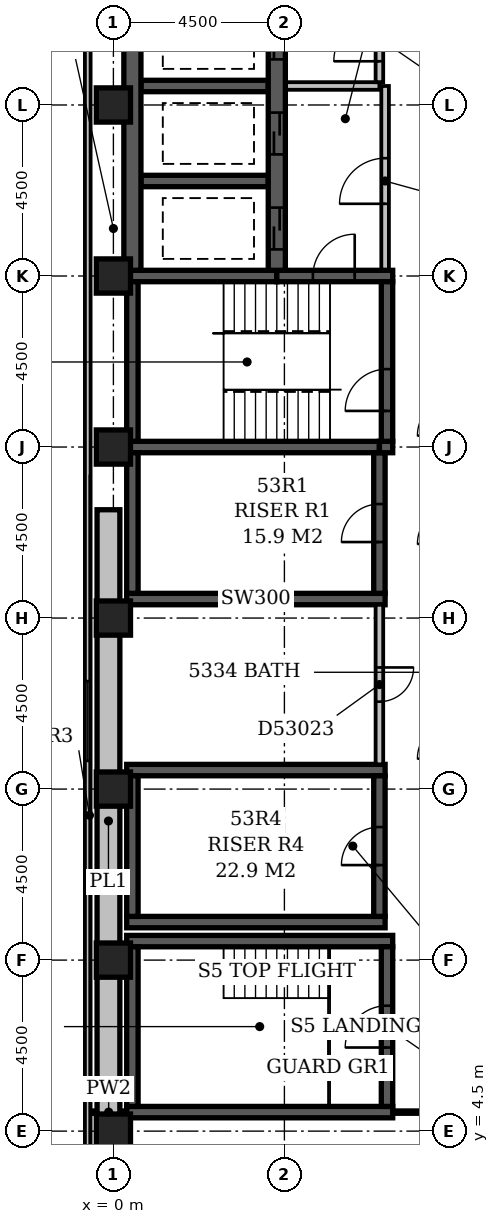
"""IFC4 building model, lengths in metres.
Left out: names, types, materials, properties, quantities, classifications, styles, units other than length and angle.
Written with IfcOpenShell. Run it as: python <this file> out.ifc"""

import sys

from ifc_helpers import new_model, si_unit, direction, frame, frame_2d, origin, origin_2d, place, context, subcontext, project, spatial, rectangle, extrude, element, fill, save


model = new_model("IFC4")
c1 = context("Model", 3, precision=1e-05, world=origin(), true_north=direction((0.0, 1.0)))
c2 = subcontext(c1, "Body", "Model", "MODEL_VIEW")
j1 = project(units=[si_unit("LENGTHUNIT", "METRE"), si_unit("PLANEANGLEUNIT", "RADIAN")], contexts=[c1])
p1 = place(None, origin())
s1 = spatial("IfcSite", under=j1, at=p1, CompositionType="ELEMENT")
p2 = place(p1, origin())
s2 = spatial("IfcBuilding", under=s1, at=p2, CompositionType="ELEMENT")
p3 = place(p2, frame((0.0, 0.0, 207.8)))
s3 = spatial("IfcBuildingStorey", under=s2, at=p3, CompositionType="ELEMENT", Elevation=207.8)
for number, where, z_axis, x_axis in (
    (1, (0.35, 5.0, -0.3), (0.0, 0.0, 1.0), (1.0, 0.0, 0.0)),
    (2, (0.35, 9.5, -0.3), (0.0, 0.0, 1.0), (1.0, 0.0, 0.0)),
):
    element("IfcWall", number, at=place(p3, frame(where, z_axis=z_axis, x_axis=x_axis)), inside=s3, PredefinedType="SHEAR", context=c2, shape_type="SweptSolid", body=[
        extrude(rectangle(XDim=7.0, YDim=0.3, at=frame_2d((3.5, 0.0))), origin(), (0.0, 0.0, 1.0), 3.55),
    ])
for number, where, z_axis, x_axis in (
    (3, (0.35, 10.0, -0.3), (0.0, 0.0, 1.0), (1.0, 0.0, 0.0)),
    (4, (0.35, 14.0, -0.3), (0.0, 0.0, 1.0), (1.0, 0.0, 0.0)),
    (5, (0.35, 18.5, -0.3), (0.0, 0.0, 1.0), (1.0, 0.0, 0.0)),
):
    element("IfcWall", number, at=place(p3, frame(where, z_axis=z_axis, x_axis=x_axis)), inside=s3, PredefinedType="SHEAR", context=c2, shape_type="SweptSolid", body=[
        extrude(rectangle(XDim=6.8, YDim=0.3, at=frame_2d((3.4, 0.0))), origin(), (0.0, 0.0, 1.0), 3.55),
    ])
p4 = place(p3, frame((0.35, 22.5, -0.3), z_axis=(0.0, 0.0, 1.0), x_axis=(1.0, 0.0, 0.0)))
e6 = element("IfcWall", 6, at=p4, inside=s3, PredefinedType="SHEAR", context=c2, shape_type="SweptSolid", body=[
    extrude(rectangle(XDim=6.65, YDim=0.3, at=frame_2d((3.325, 0.0))), origin(), (0.0, 0.0, 1.0), 3.55),
])
p5 = place(p3, frame((0.35, 27.0, -0.3), z_axis=(0.0, 0.0, 1.0), x_axis=(1.0, 0.0, 0.0)))
e7 = element("IfcWall", 7, at=p5, inside=s3, PredefinedType="SHEAR", context=c2, shape_type="SweptSolid", body=[
    extrude(rectangle(XDim=3.95, YDim=0.3, at=frame_2d((1.975, 0.0))), origin(), (0.0, 0.0, 1.0), 3.55),
])
p6 = place(p3, frame((0.5, 5.15, -0.3), z_axis=(0.0, 0.0, 1.0), x_axis=(0.0, 1.0, 0.0)))
e8 = element("IfcWall", 8, at=p6, inside=s3, PredefinedType="SHEAR", context=c2, shape_type="SweptSolid", body=[
    extrude(rectangle(XDim=4.2, YDim=0.3, at=frame_2d((2.1, 0.0))), origin(), (0.0, 0.0, 1.0), 3.55),
])
for number, where, z_axis, x_axis in (
    (9, (0.5, 10.15, -0.3), (0.0, 0.0, 1.0), (0.0, 1.0, 0.0)),
    (10, (0.5, 18.65, -0.3), (0.0, 0.0, 1.0), (0.0, 1.0, 0.0)),
):
    element("IfcWall", number, at=place(p3, frame(where, z_axis=z_axis, x_axis=x_axis)), inside=s3, PredefinedType="SHEAR", context=c2, shape_type="SweptSolid", body=[
        extrude(rectangle(XDim=3.7, YDim=0.3, at=frame_2d((1.85, 0.0))), origin(), (0.0, 0.0, 1.0), 3.55),
    ])
p7 = place(p3, frame((0.5, 22.65, -0.3), z_axis=(0.0, 0.0, 1.0), x_axis=(0.0, 1.0, 0.0)))
e11 = element("IfcWall", 11, at=p7, inside=s3, PredefinedType="SHEAR", context=c2, shape_type="SweptSolid", body=[
    extrude(rectangle(XDim=4.2, YDim=0.3, at=frame_2d((2.1, 0.0))), origin(), (0.0, 0.0, 1.0), 3.55),
])
p8 = place(p3, frame((0.5, 27.15, -0.3), z_axis=(0.0, 0.0, 1.0), x_axis=(0.0, 1.0, 0.0)))
e12 = element("IfcWall", 12, at=p8, inside=s3, PredefinedType="SHEAR", context=c2, shape_type="SweptSolid", body=[
    extrude(rectangle(XDim=22.125, YDim=0.45, at=frame_2d((11.062, 0.0))), origin(), (0.0, 0.0, 1.0), 3.55),
])
for number, where, z_axis, x_axis in (
    (13, (0.725, 29.5, -0.3), (0.0, 0.0, 1.0), (1.0, 0.0, 0.0)),
    (14, (0.725, 32.0, -0.3), (0.0, 0.0, 1.0), (1.0, 0.0, 0.0)),
):
    element("IfcWall", number, at=place(p3, frame(where, z_axis=z_axis, x_axis=x_axis)), inside=s3, PredefinedType="SHEAR", context=c2, shape_type="SweptSolid", body=[
        extrude(rectangle(XDim=3.35, YDim=0.3, at=frame_2d((1.675, 0.0))), origin(), (0.0, 0.0, 1.0), 3.55),
    ])
p9 = place(p3, frame((4.3, 27.0, -0.3), z_axis=(0.0, 0.0, 1.0), x_axis=(1.0, 0.0, 0.0)))
e15 = element("IfcWall", 15, at=p9, inside=s3, PredefinedType="SHEAR", context=c2, shape_type="SweptSolid", body=[
    extrude(rectangle(XDim=3.05, YDim=0.3, at=frame_2d((1.525, 0.0))), origin(), (0.0, 0.0, 1.0), 3.55),
])
p10 = place(p9, frame((0.95, 0.0, 0.3)))
e16 = element("IfcOpeningElement", 16, at=p10, cuts=e15, PredefinedType="OPENING", context=c2, shape_type="SweptSolid", body=[
    extrude(rectangle(XDim=1.1, YDim=2.1, at=frame_2d((0.55, 1.05))), frame((0.0, 0.162, 0.0), z_axis=(0.0, -1.0, 0.0), x_axis=(1.0, 0.0, 0.0)), (0.0, 0.0, 1.0), 0.324),
])
p11 = place(p3, frame((4.3, 27.15, -0.3), z_axis=(0.0, 0.0, 1.0), x_axis=(0.0, 1.0, 0.0)))
e17 = element("IfcWall", 17, at=p11, inside=s3, PredefinedType="SHEAR", context=c2, shape_type="SweptSolid", body=[
    extrude(rectangle(XDim=22.125, YDim=0.45, at=frame_2d((11.062, 0.0))), origin(), (0.0, 0.0, 1.0), 3.55),
])
p12 = place(p11, frame((3.05, 0.0, 0.3)))
e18 = element("IfcOpeningElement", 18, at=p12, cuts=e17, PredefinedType="OPENING", context=c2, shape_type="SweptSolid", body=[
    extrude(rectangle(XDim=1.1, YDim=2.1, at=frame_2d((0.55, 1.05))), frame((0.0, 0.237, 0.0), z_axis=(0.0, -1.0, 0.0), x_axis=(1.0, 0.0, 0.0)), (0.0, 0.0, 1.0), 0.474),
])
p13 = place(p11, frame((0.55, 0.0, 0.3)))
e19 = element("IfcOpeningElement", 19, at=p13, cuts=e17, PredefinedType="OPENING", context=c2, shape_type="SweptSolid", body=[
    extrude(rectangle(XDim=1.1, YDim=2.1, at=frame_2d((0.55, 1.05))), frame((0.0, 0.237, 0.0), z_axis=(0.0, -1.0, 0.0), x_axis=(1.0, 0.0, 0.0)), (0.0, 0.0, 1.0), 0.474),
])
p14 = place(p11, frame((20.55, 0.0, 0.3)))
e20 = element("IfcOpeningElement", 20, at=p14, cuts=e17, PredefinedType="OPENING", context=c2, shape_type="SweptSolid", body=[
    extrude(rectangle(XDim=1.1, YDim=2.1, at=frame_2d((0.55, 1.05))), frame((0.0, 0.237, 0.0), z_axis=(0.0, -1.0, 0.0), x_axis=(1.0, 0.0, 0.0)), (0.0, 0.0, 1.0), 0.474),
])
p15 = place(p11, frame((18.05, 0.0, 0.3)))
e21 = element("IfcOpeningElement", 21, at=p15, cuts=e17, PredefinedType="OPENING", context=c2, shape_type="SweptSolid", body=[
    extrude(rectangle(XDim=1.1, YDim=2.1, at=frame_2d((0.55, 1.05))), frame((0.0, 0.237, 0.0), z_axis=(0.0, -1.0, 0.0), x_axis=(1.0, 0.0, 0.0)), (0.0, 0.0, 1.0), 0.474),
])
p16 = place(p11, frame((15.55, 0.0, 0.3)))
e22 = element("IfcOpeningElement", 22, at=p16, cuts=e17, PredefinedType="OPENING", context=c2, shape_type="SweptSolid", body=[
    extrude(rectangle(XDim=1.1, YDim=2.1, at=frame_2d((0.55, 1.05))), frame((0.0, 0.237, 0.0), z_axis=(0.0, -1.0, 0.0), x_axis=(1.0, 0.0, 0.0)), (0.0, 0.0, 1.0), 0.474),
])
p17 = place(p11, frame((13.05, 0.0, 0.3)))
e23 = element("IfcOpeningElement", 23, at=p17, cuts=e17, PredefinedType="OPENING", context=c2, shape_type="SweptSolid", body=[
    extrude(rectangle(XDim=1.1, YDim=2.1, at=frame_2d((0.55, 1.05))), frame((0.0, 0.237, 0.0), z_axis=(0.0, -1.0, 0.0), x_axis=(1.0, 0.0, 0.0)), (0.0, 0.0, 1.0), 0.474),
])
p18 = place(p11, frame((10.55, 0.0, 0.3)))
e24 = element("IfcOpeningElement", 24, at=p18, cuts=e17, PredefinedType="OPENING", context=c2, shape_type="SweptSolid", body=[
    extrude(rectangle(XDim=1.1, YDim=2.1, at=frame_2d((0.55, 1.05))), frame((0.0, 0.237, 0.0), z_axis=(0.0, -1.0, 0.0), x_axis=(1.0, 0.0, 0.0)), (0.0, 0.0, 1.0), 0.474),
])
p19 = place(p11, frame((8.05, 0.0, 0.3)))
e25 = element("IfcOpeningElement", 25, at=p19, cuts=e17, PredefinedType="OPENING", context=c2, shape_type="SweptSolid", body=[
    extrude(rectangle(XDim=1.1, YDim=2.1, at=frame_2d((0.55, 1.05))), frame((0.0, 0.237, 0.0), z_axis=(0.0, -1.0, 0.0), x_axis=(1.0, 0.0, 0.0)), (0.0, 0.0, 1.0), 0.474),
])
p20 = place(p11, frame((5.55, 0.0, 0.3)))
e26 = element("IfcOpeningElement", 26, at=p20, cuts=e17, PredefinedType="OPENING", context=c2, shape_type="SweptSolid", body=[
    extrude(rectangle(XDim=1.1, YDim=2.1, at=frame_2d((0.55, 1.05))), frame((0.0, 0.237, 0.0), z_axis=(0.0, -1.0, 0.0), x_axis=(1.0, 0.0, 0.0)), (0.0, 0.0, 1.0), 0.474),
])
p21 = place(p3, frame((7.0, 10.15, -0.3), z_axis=(0.0, 0.0, 1.0), x_axis=(0.0, 1.0, 0.0)))
e27 = element("IfcWall", 27, at=p21, inside=s3, PredefinedType="SHEAR", context=c2, shape_type="SweptSolid", body=[
    extrude(rectangle(XDim=3.7, YDim=0.3, at=frame_2d((1.85, 0.0))), origin(), (0.0, 0.0, 1.0), 3.55),
])
p22 = place(p21, frame((1.35, 0.0, 0.3)))
e28 = element("IfcOpeningElement", 28, at=p22, cuts=e27, PredefinedType="OPENING", context=c2, shape_type="SweptSolid", body=[
    extrude(rectangle(XDim=1.0, YDim=2.1, at=frame_2d((0.5, 1.05))), frame((0.0, 0.162, 0.0), z_axis=(0.0, -1.0, 0.0), x_axis=(1.0, 0.0, 0.0)), (0.0, 0.0, 1.0), 0.324),
])
p23 = place(p3, frame((7.0, 18.65, -0.3), z_axis=(0.0, 0.0, 1.0), x_axis=(0.0, 1.0, 0.0)))
e29 = element("IfcWall", 29, at=p23, inside=s3, PredefinedType="SHEAR", context=c2, shape_type="SweptSolid", body=[
    extrude(rectangle(XDim=3.7, YDim=0.3, at=frame_2d((1.85, 0.0))), origin(), (0.0, 0.0, 1.0), 3.55),
])
p24 = place(p23, frame((1.35, 0.0, 0.3)))
e30 = element("IfcOpeningElement", 30, at=p24, cuts=e29, PredefinedType="OPENING", context=c2, shape_type="SweptSolid", body=[
    extrude(rectangle(XDim=1.0, YDim=2.1, at=frame_2d((0.5, 1.05))), frame((0.0, 0.162, 0.0), z_axis=(0.0, -1.0, 0.0), x_axis=(1.0, 0.0, 0.0)), (0.0, 0.0, 1.0), 0.324),
])
p25 = place(p3, frame((7.0, 22.5, -0.3), z_axis=(0.0, 0.0, 1.0), x_axis=(1.0, 0.0, 0.0)))
e31 = element("IfcWall", 31, at=p25, inside=s3, PredefinedType="SHEAR", context=c2, shape_type="SweptSolid", body=[
    extrude(rectangle(XDim=0.35, YDim=0.3, at=frame_2d((0.175, 0.0))), origin(), (0.0, 0.0, 1.0), 3.55),
])
p26 = place(p3, frame((7.2, 5.15, -0.3), z_axis=(0.0, 0.0, 1.0), x_axis=(0.0, 1.0, 0.0)))
e32 = element("IfcWall", 32, at=p26, inside=s3, PredefinedType="SHEAR", context=c2, shape_type="SweptSolid", body=[
    extrude(rectangle(XDim=4.2, YDim=0.3, at=frame_2d((2.1, 0.0))), origin(), (0.0, 0.0, 1.0), 3.55),
])
p27 = place(p26, frame((1.55, 0.0, 0.3)))
e33 = element("IfcOpeningElement", 33, at=p27, cuts=e32, PredefinedType="OPENING", context=c2, shape_type="SweptSolid", body=[
    extrude(rectangle(XDim=1.1, YDim=2.1, at=frame_2d((0.55, 1.05))), frame((0.0, 0.162, 0.0), z_axis=(0.0, -1.0, 0.0), x_axis=(1.0, 0.0, 0.0)), (0.0, 0.0, 1.0), 0.324),
])
p28 = place(p3, frame((7.2, 22.65, -0.3), z_axis=(0.0, 0.0, 1.0), x_axis=(0.0, 1.0, 0.0)))
e34 = element("IfcWall", 34, at=p28, inside=s3, PredefinedType="SHEAR", context=c2, shape_type="SweptSolid", body=[
    extrude(rectangle(XDim=4.2, YDim=0.3, at=frame_2d((2.1, 0.0))), origin(), (0.0, 0.0, 1.0), 3.55),
])
p29 = place(p28, frame((0.8, 0.0, 0.3)))
e35 = element("IfcOpeningElement", 35, at=p29, cuts=e34, PredefinedType="OPENING", context=c2, shape_type="SweptSolid", body=[
    extrude(rectangle(XDim=1.1, YDim=2.1, at=frame_2d((0.55, 1.05))), frame((0.0, 0.162, 0.0), z_axis=(0.0, -1.0, 0.0), x_axis=(1.0, 0.0, 0.0)), (0.0, 0.0, 1.0), 0.324),
])
for number, where, z_axis, x_axis in (
    (36, (0.0, 4.5, -0.3), (0.0, 0.0, 1.0), (1.0, 0.0, 0.0)),
    (37, (0.0, 9.0, -0.3), (0.0, 0.0, 1.0), (1.0, 0.0, 0.0)),
    (38, (0.0, 13.5, -0.3), (0.0, 0.0, 1.0), (1.0, 0.0, 0.0)),
    (39, (0.0, 18.0, -0.3), (0.0, 0.0, 1.0), (1.0, 0.0, 0.0)),
    (40, (0.0, 22.5, -0.3), (0.0, 0.0, 1.0), (1.0, 0.0, 0.0)),
    (41, (0.0, 27.0, -0.3), (0.0, 0.0, 1.0), (1.0, 0.0, 0.0)),
    (42, (0.0, 31.5, -0.3), (0.0, 0.0, 1.0), (1.0, 0.0, 0.0)),
):
    element("IfcColumn", number, at=place(p3, frame(where, z_axis=z_axis, x_axis=x_axis)), inside=s3, PredefinedType="COLUMN", context=c2, shape_type="SweptSolid", body=[
        extrude(rectangle(XDim=0.9, YDim=0.9, at=origin_2d()), origin(), (0.0, 0.0, 1.0), 3.55),
    ])
p30 = place(p3, frame((-0.675, 59.1, 0.0), z_axis=(0.0, 0.0, 1.0), x_axis=(0.0, -1.0, 0.0)))
e43 = element("IfcWall", 43, at=p30, inside=s3, PredefinedType="STANDARD", context=c2, shape_type="SweptSolid", body=[
    extrude(rectangle(XDim=55.35, YDim=0.15, at=frame_2d((27.675, 0.0))), origin(), (0.0, 0.0, 1.0), 2.7),
])
p31 = place(p30, frame((42.758, 0.0, 0.6)))
e44 = element("IfcOpeningElement", 44, at=p31, cuts=e43, PredefinedType="OPENING", context=c2, shape_type="SweptSolid", body=[
    extrude(rectangle(XDim=2.1, YDim=1.8, at=frame_2d((1.05, 0.9))), frame((0.0, 0.087, 0.0), z_axis=(0.0, -1.0, 0.0), x_axis=(1.0, 0.0, 0.0)), (0.0, 0.0, 1.0), 0.174),
])
p32 = place(p3, frame((-0.13, 4.47, 3.6), z_axis=(0.0, 0.0, 1.0), x_axis=(0.0, 1.0, 0.0)))
e45 = element("IfcWall", 45, at=p32, inside=s3, PredefinedType="STANDARD", context=c2, shape_type="SweptSolid", body=[
    extrude(rectangle(XDim=16.38, YDim=0.6, at=frame_2d((8.19, 0.0))), origin(), (0.0, 0.0, 1.0), 0.6),
])
p33 = place(p3, frame((4.545, 32.0, 0.0), z_axis=(0.0, 0.0, 1.0), x_axis=(1.0, 0.0, 0.0)))
e46 = element("IfcWall", 46, at=p33, inside=s3, PredefinedType="PARTITIONING", context=c2, shape_type="SweptSolid", body=[
    extrude(rectangle(XDim=2.455, YDim=0.2, at=frame_2d((1.228, 0.0))), origin(), (0.0, 0.0, 1.0), 3.25),
])
p34 = place(p3, frame((7.0, 32.1, 0.0), z_axis=(0.0, 0.0, 1.0), x_axis=(0.0, 1.0, 0.0)))
e47 = element("IfcWall", 47, at=p34, inside=s3, PredefinedType="PARTITIONING", context=c2, shape_type="SweptSolid", body=[
    extrude(rectangle(XDim=2.3, YDim=0.2, at=frame_2d((1.15, 0.0))), origin(), (0.0, 0.0, 1.0), 3.25),
])
p35 = place(p34, frame((0.55, 0.0, 0.0)))
e48 = element("IfcOpeningElement", 48, at=p35, cuts=e47, PredefinedType="OPENING", context=c2, shape_type="SweptSolid", body=[
    extrude(rectangle(XDim=1.2, YDim=2.1, at=frame_2d((0.6, 1.05))), frame((0.0, 0.112, 0.0), z_axis=(0.0, -1.0, 0.0), x_axis=(1.0, 0.0, 0.0)), (0.0, 0.0, 1.0), 0.224),
])
p36 = place(p3, frame((7.15, 27.17, 0.0), z_axis=(0.0, 0.0, 1.0), x_axis=(0.0, 1.0, 0.0)))
e49 = element("IfcWall", 49, at=p36, inside=s3, PredefinedType="PARTITIONING", context=c2, shape_type="SweptSolid", body=[
    extrude(rectangle(XDim=4.83, YDim=0.2, at=frame_2d((2.415, 0.0))), origin(), (0.0, 0.0, 1.0), 3.25),
])
p37 = place(p36, frame((1.73, 0.0, 0.0)))
e50 = element("IfcOpeningElement", 50, at=p37, cuts=e49, PredefinedType="OPENING", context=c2, shape_type="SweptSolid", body=[
    extrude(rectangle(XDim=1.2, YDim=2.1, at=frame_2d((0.6, 1.05))), frame((0.0, 0.112, 0.0), z_axis=(0.0, -1.0, 0.0), x_axis=(1.0, 0.0, 0.0)), (0.0, 0.0, 1.0), 0.224),
])
p38 = place(p3, frame((0.0, 4.95, 0.0), z_axis=(0.0, 0.0, 1.0), x_axis=(0.0, 1.0, 0.0)))
e51 = element("IfcWall", 51, at=p38, inside=s3, PredefinedType="PARTITIONING", context=c2, shape_type="SweptSolid", body=[
    extrude(rectangle(XDim=0.65, YDim=0.1, at=frame_2d((0.325, 0.0))), origin(), (0.0, 0.0, 1.0), 2.7),
])
p39 = place(p3, frame((-0.6, 5.0, 0.0), z_axis=(0.0, 0.0, 1.0), x_axis=(1.0, 0.0, 0.0)))
e52 = element("IfcWall", 52, at=p39, inside=s3, PredefinedType="PARTITIONING", context=c2, shape_type="SweptSolid", body=[
    extrude(rectangle(XDim=0.951, YDim=0.1, at=frame_2d((0.476, 0.0))), origin(), (0.0, 0.0, 1.0), 3.25),
])
p40 = place(p3, frame((7.349, 5.0, 0.0), z_axis=(0.0, 0.0, 1.0), x_axis=(1.0, 0.0, 0.0)))
e53 = element("IfcWall", 53, at=p40, inside=s3, PredefinedType="PARTITIONING", context=c2, shape_type="SweptSolid", body=[
    extrude(rectangle(XDim=1.551, YDim=0.1, at=frame_2d((0.775, 0.0))), origin(), (0.0, 0.0, 1.0), 3.25),
])
p41 = place(p3, frame((7.0, 14.15, 0.0), z_axis=(0.0, 0.0, 1.0), x_axis=(0.0, 1.0, 0.0)))
e54 = element("IfcWall", 54, at=p41, inside=s3, PredefinedType="PARTITIONING", context=c2, shape_type="SweptSolid", body=[
    extrude(rectangle(XDim=4.2, YDim=0.2, at=frame_2d((2.1, 0.0))), origin(), (0.0, 0.0, 1.0), 3.25),
])
p42 = place(p41, frame((1.65, 0.0, 0.0)))
e55 = element("IfcOpeningElement", 55, at=p42, cuts=e54, PredefinedType="OPENING", context=c2, shape_type="SweptSolid", body=[
    extrude(rectangle(XDim=0.9, YDim=2.1, at=frame_2d((0.45, 1.05))), frame((0.0, 0.112, 0.0), z_axis=(0.0, -1.0, 0.0), x_axis=(1.0, 0.0, 0.0)), (0.0, 0.0, 1.0), 0.224),
])
p43 = place(p31, origin())
e56 = element("IfcWindow", 56, at=p43, inside=s3, PartitioningType="SINGLE_PANEL", PredefinedType="WINDOW", context=c2, shape_type="SweptSolid", body=[
    extrude(rectangle(XDim=2.1, YDim=1.8, at=frame_2d((1.05, 0.9))), frame((0.0, 0.03, 0.0), z_axis=(0.0, -1.0, 0.0), x_axis=(1.0, 0.0, 0.0)), (0.0, 0.0, 1.0), 0.06),
])
fill(e44, e56)
p44 = place(p37, origin())
e57 = element("IfcDoor", 57, at=p44, inside=s3, OperationType="SINGLE_SWING_LEFT", PredefinedType="DOOR", context=c2, shape_type="SweptSolid", body=[
    extrude(rectangle(XDim=1.2, YDim=2.1, at=frame_2d((0.6, 1.05))), frame((0.0, 0.025, 0.0), z_axis=(0.0, -1.0, 0.0), x_axis=(1.0, 0.0, 0.0)), (0.0, 0.0, 1.0), 0.05),
])
fill(e50, e57)
p45 = place(p12, origin())
e58 = element("IfcDoor", 58, at=p45, inside=s3, OperationType="SLIDING_TO_LEFT", PredefinedType="DOOR", context=c2, shape_type="SweptSolid", body=[
    extrude(rectangle(XDim=1.1, YDim=2.1, at=frame_2d((0.55, 1.05))), frame((0.0, 0.025, 0.0), z_axis=(0.0, -1.0, 0.0), x_axis=(1.0, 0.0, 0.0)), (0.0, 0.0, 1.0), 0.05),
])
fill(e18, e58)
p46 = place(p13, origin())
e59 = element("IfcDoor", 59, at=p46, inside=s3, OperationType="SLIDING_TO_LEFT", PredefinedType="DOOR", context=c2, shape_type="SweptSolid", body=[
    extrude(rectangle(XDim=1.1, YDim=2.1, at=frame_2d((0.55, 1.05))), frame((0.0, 0.025, 0.0), z_axis=(0.0, -1.0, 0.0), x_axis=(1.0, 0.0, 0.0)), (0.0, 0.0, 1.0), 0.05),
])
fill(e19, e59)
p47 = place(p35, origin())
e60 = element("IfcDoor", 60, at=p47, inside=s3, OperationType="SINGLE_SWING_LEFT", PredefinedType="DOOR", context=c2, shape_type="SweptSolid", body=[
    extrude(rectangle(XDim=1.2, YDim=2.1, at=frame_2d((0.6, 1.05))), frame((0.0, 0.025, 0.0), z_axis=(0.0, -1.0, 0.0), x_axis=(1.0, 0.0, 0.0)), (0.0, 0.0, 1.0), 0.05),
])
fill(e48, e60)
p48 = place(p20, origin())
e61 = element("IfcDoor", 61, at=p48, inside=s3, OperationType="SLIDING_TO_LEFT", PredefinedType="DOOR", context=c2, shape_type="SweptSolid", body=[
    extrude(rectangle(XDim=1.1, YDim=2.1, at=frame_2d((0.55, 1.05))), frame((0.0, 0.025, 0.0), z_axis=(0.0, -1.0, 0.0), x_axis=(1.0, 0.0, 0.0)), (0.0, 0.0, 1.0), 0.05),
])
fill(e26, e61)
p49 = place(p24, origin())
e62 = element("IfcDoor", 62, at=p49, inside=s3, OperationType="SINGLE_SWING_LEFT", PredefinedType="DOOR", context=c2, shape_type="SweptSolid", body=[
    extrude(rectangle(XDim=1.0, YDim=2.1, at=frame_2d((0.5, 1.05))), frame((0.0, 0.025, 0.0), z_axis=(0.0, -1.0, 0.0), x_axis=(1.0, 0.0, 0.0)), (0.0, 0.0, 1.0), 0.05),
])
fill(e30, e62)
p50 = place(p22, origin())
e63 = element("IfcDoor", 63, at=p50, inside=s3, OperationType="SINGLE_SWING_LEFT", PredefinedType="DOOR", context=c2, shape_type="SweptSolid", body=[
    extrude(rectangle(XDim=1.0, YDim=2.1, at=frame_2d((0.5, 1.05))), frame((0.0, 0.025, 0.0), z_axis=(0.0, -1.0, 0.0), x_axis=(1.0, 0.0, 0.0)), (0.0, 0.0, 1.0), 0.05),
])
fill(e28, e63)
p51 = place(p10, frame((1.1, 0.0, 0.0), z_axis=(0.0, 0.0, 1.0), x_axis=(-1.0, 0.0, 0.0)))
e64 = element("IfcDoor", 64, at=p51, inside=s3, OperationType="SINGLE_SWING_LEFT", PredefinedType="DOOR", context=c2, shape_type="SweptSolid", body=[
    extrude(rectangle(XDim=1.1, YDim=2.1, at=frame_2d((0.55, 1.05))), frame((0.0, 0.025, 0.0), z_axis=(0.0, -1.0, 0.0), x_axis=(1.0, 0.0, 0.0)), (0.0, 0.0, 1.0), 0.05),
])
fill(e16, e64)
p52 = place(p29, origin())
e65 = element("IfcDoor", 65, at=p52, inside=s3, OperationType="SINGLE_SWING_LEFT", PredefinedType="DOOR", context=c2, shape_type="SweptSolid", body=[
    extrude(rectangle(XDim=1.1, YDim=2.1, at=frame_2d((0.55, 1.05))), frame((0.0, 0.025, 0.0), z_axis=(0.0, -1.0, 0.0), x_axis=(1.0, 0.0, 0.0)), (0.0, 0.0, 1.0), 0.05),
])
fill(e35, e65)
p53 = place(p27, origin())
e66 = element("IfcDoor", 66, at=p53, inside=s3, OperationType="SINGLE_SWING_LEFT", PredefinedType="DOOR", context=c2, shape_type="SweptSolid", body=[
    extrude(rectangle(XDim=1.1, YDim=2.1, at=frame_2d((0.55, 1.05))), frame((0.0, 0.025, 0.0), z_axis=(0.0, -1.0, 0.0), x_axis=(1.0, 0.0, 0.0)), (0.0, 0.0, 1.0), 0.05),
])
fill(e33, e66)
p54 = place(p42, origin())
e67 = element("IfcDoor", 67, at=p54, inside=s3, OperationType="SINGLE_SWING_RIGHT", PredefinedType="DOOR", context=c2, shape_type="SweptSolid", body=[
    extrude(rectangle(XDim=0.9, YDim=2.1, at=frame_2d((0.45, 1.05))), frame((0.0, 0.025, 0.0), z_axis=(0.0, -1.0, 0.0), x_axis=(1.0, 0.0, 0.0)), (0.0, 0.0, 1.0), 0.05),
])
fill(e55, e67)
save(model, sys.argv[1])
